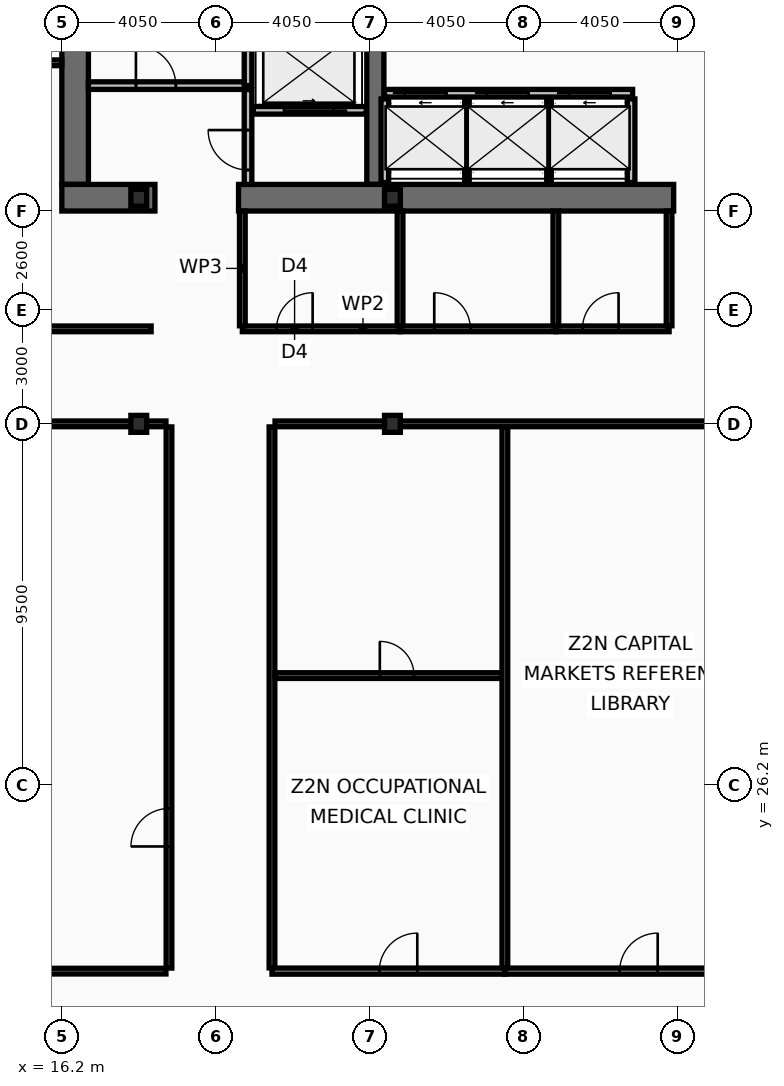
"""IFC4 building model, lengths in metres.
Left out: names, types, materials, properties, quantities, classifications, styles, units other than length and angle.
Written with IfcOpenShell. Run it as: python <this file> out.ifc"""

import sys

from ifc_helpers import new_model, si_unit, direction, frame, frame_2d, origin, origin_2d, place, context, subcontext, project, spatial, rectangle, i_section, extrude, element, fill, save


model = new_model("IFC4")
c1 = context("Model", 3, precision=1e-05, world=origin(), true_north=direction((0.0, 1.0)))
c2 = subcontext(c1, "Body", "Model", "MODEL_VIEW")
j1 = project(units=[si_unit("LENGTHUNIT", "METRE"), si_unit("PLANEANGLEUNIT", "RADIAN")], contexts=[c1])
p1 = place(None, origin())
s1 = spatial("IfcSite", under=j1, at=p1, CompositionType="ELEMENT")
p2 = place(p1, origin())
s2 = spatial("IfcBuilding", under=s1, at=p2, CompositionType="ELEMENT")
p3 = place(p2, frame((0.0, 0.0, 111.0)))
s3 = spatial("IfcBuildingStorey", under=s2, at=p3, CompositionType="ELEMENT", Elevation=111.0)
p4 = place(p3, frame((16.55, 42.0, 0.0), z_axis=(0.0, 0.0, 1.0), x_axis=(0.0, 1.0, 0.0)))
e1 = element("IfcWall", 1, at=p4, inside=s3, PredefinedType="SHEAR", context=c2, shape_type="SweptSolid", body=[
    extrude(rectangle(XDim=11.0, YDim=0.7, at=frame_2d((5.5, 0.0))), origin(), (0.0, 0.0, 1.0), 3.44),
])
p5 = place(p3, frame((24.45, 42.0, 0.0), z_axis=(0.0, 0.0, 1.0), x_axis=(0.0, 1.0, 0.0)))
e2 = element("IfcWall", 2, at=p5, inside=s3, PredefinedType="SHEAR", context=c2, shape_type="SweptSolid", body=[
    extrude(rectangle(XDim=11.0, YDim=0.45, at=frame_2d((5.5, 0.0))), origin(), (0.0, 0.0, 1.0), 3.44),
])
p6 = place(p3, frame((18.65, 41.65, 0.0), z_axis=(0.0, 0.0, 1.0), x_axis=(-1.0, 0.0, 0.0)))
e3 = element("IfcWall", 3, at=p6, inside=s3, PredefinedType="SHEAR", context=c2, shape_type="SweptSolid", body=[
    extrude(rectangle(XDim=2.45, YDim=0.7, at=frame_2d((1.225, 0.0))), origin(), (0.0, 0.0, 1.0), 3.44),
])
p7 = place(p3, frame((32.3, 41.65, 0.0), z_axis=(0.0, 0.0, 1.0), x_axis=(-1.0, 0.0, 0.0)))
e4 = element("IfcWall", 4, at=p7, inside=s3, PredefinedType="SHEAR", context=c2, shape_type="SweptSolid", body=[
    extrude(rectangle(XDim=11.45, YDim=0.7, at=frame_2d((5.725, 0.0))), origin(), (0.0, 0.0, 1.0), 3.44),
])
for number, where, z_axis, x_axis in (
    (5, (18.225, 35.7, 0.0), (0.0, 0.0, 1.0), (1.0, 0.0, 0.0)),
    (6, (18.225, 41.65, 0.0), (0.0, 0.0, 1.0), (1.0, 0.0, 0.0)),
    (7, (24.9, 35.7, 0.0), (0.0, 0.0, 1.0), (1.0, 0.0, 0.0)),
    (8, (24.9, 41.65, 0.0), (0.0, 0.0, 1.0), (1.0, 0.0, 0.0)),
):
    element("IfcColumn", number, at=place(p3, frame(where, z_axis=z_axis, x_axis=x_axis)), inside=s3, PredefinedType="COLUMN", context=c2, shape_type="SweptSolid", body=[
        extrude(i_section(OverallWidth=0.416, OverallDepth=0.446, WebThickness=0.039, FlangeThickness=0.063, at=origin_2d()), origin(), (0.0, 0.0, 1.0), 3.6),
    ])
p8 = place(p3, frame((24.69, 44.4, 0.0), z_axis=(0.0, 0.0, 1.0), x_axis=(1.0, 0.0, 0.0)))
e9 = element("IfcWall", 9, at=p8, inside=s3, PredefinedType="PARTITIONING", context=c2, shape_type="SweptSolid", body=[
    extrude(rectangle(XDim=6.53, YDim=0.2, at=frame_2d((3.265, 0.0))), origin(), (0.0, 0.0, 1.0), 3.44),
])
p9 = place(p8, frame((0.53, 0.0, 0.0)))
e10 = element("IfcOpeningElement", 10, at=p9, cuts=e9, PredefinedType="OPENING", context=c2, shape_type="SweptSolid", body=[
    extrude(rectangle(XDim=1.1, YDim=2.18, at=frame_2d((0.55, 1.09))), frame((0.0, 0.11, 0.0), z_axis=(0.0, -1.0, 0.0), x_axis=(1.0, 0.0, 0.0)), (0.0, 0.0, 1.0), 0.22),
])
p10 = place(p8, frame((2.69, 0.0, 0.0)))
e11 = element("IfcOpeningElement", 11, at=p10, cuts=e9, PredefinedType="OPENING", context=c2, shape_type="SweptSolid", body=[
    extrude(rectangle(XDim=1.1, YDim=2.18, at=frame_2d((0.55, 1.09))), frame((0.0, 0.11, 0.0), z_axis=(0.0, -1.0, 0.0), x_axis=(1.0, 0.0, 0.0)), (0.0, 0.0, 1.0), 0.22),
])
p11 = place(p8, frame((4.85, 0.0, 0.0)))
e12 = element("IfcOpeningElement", 12, at=p11, cuts=e9, PredefinedType="OPENING", context=c2, shape_type="SweptSolid", body=[
    extrude(rectangle(XDim=1.1, YDim=2.18, at=frame_2d((0.55, 1.09))), frame((0.0, 0.11, 0.0), z_axis=(0.0, -1.0, 0.0), x_axis=(1.0, 0.0, 0.0)), (0.0, 0.0, 1.0), 0.22),
])
p12 = place(p3, frame((24.21, 43.95, 0.0), z_axis=(0.0, 0.0, 1.0), x_axis=(-1.0, 0.0, 0.0)))
e13 = element("IfcWall", 13, at=p12, inside=s3, PredefinedType="PARTITIONING", context=c2, shape_type="SweptSolid", body=[
    extrude(rectangle(XDim=2.97, YDim=0.2, at=frame_2d((1.485, 0.0))), origin(), (0.0, 0.0, 1.0), 3.44),
])
p13 = place(p12, frame((0.86, 0.0, 0.0)))
e14 = element("IfcOpeningElement", 14, at=p13, cuts=e13, PredefinedType="OPENING", context=c2, shape_type="SweptSolid", body=[
    extrude(rectangle(XDim=1.3, YDim=2.18, at=frame_2d((0.65, 1.09))), frame((0.0, 0.11, 0.0), z_axis=(0.0, -1.0, 0.0), x_axis=(1.0, 0.0, 0.0)), (0.0, 0.0, 1.0), 0.22),
])
p14 = place(p3, frame((21.1, 44.6, 0.0), z_axis=(0.0, 0.0, 1.0), x_axis=(0.0, 1.0, 0.0)))
e15 = element("IfcWall", 15, at=p14, inside=s3, PredefinedType="PARTITIONING", context=c2, shape_type="SweptSolid", body=[
    extrude(rectangle(XDim=4.3, YDim=0.2, at=frame_2d((2.15, 0.0))), origin(), (0.0, 0.0, 1.0), 3.44),
])
p15 = place(p3, frame((16.9, 44.6, 0.0), z_axis=(0.0, 0.0, 1.0), x_axis=(1.0, 0.0, 0.0)))
e16 = element("IfcWall", 16, at=p15, inside=s3, PredefinedType="PARTITIONING", context=c2, shape_type="SweptSolid", body=[
    extrude(rectangle(XDim=4.1, YDim=0.2, at=frame_2d((2.05, 0.0))), origin(), (0.0, 0.0, 1.0), 3.44),
])
p16 = place(p15, frame((1.25, 0.0, 0.0)))
e17 = element("IfcOpeningElement", 17, at=p16, cuts=e16, PredefinedType="OPENING", context=c2, shape_type="SweptSolid", body=[
    extrude(rectangle(XDim=1.05, YDim=2.15, at=frame_2d((0.525, 1.075))), frame((0.0, 0.11, 0.0), z_axis=(0.0, -1.0, 0.0), x_axis=(1.0, 0.0, 0.0)), (0.0, 0.0, 1.0), 0.22),
])
p17 = place(p3, frame((21.1, 42.0, 0.0), z_axis=(0.0, 0.0, 1.0), x_axis=(0.0, 1.0, 0.0)))
e18 = element("IfcWall", 18, at=p17, inside=s3, PredefinedType="PARTITIONING", context=c2, shape_type="SweptSolid", body=[
    extrude(rectangle(XDim=2.495, YDim=0.2, at=frame_2d((1.248, 0.0))), origin(), (0.0, 0.0, 1.0), 3.44),
])
p18 = place(p17, frame((0.38, 0.0, 0.0)))
e19 = element("IfcOpeningElement", 19, at=p18, cuts=e18, PredefinedType="OPENING", context=c2, shape_type="SweptSolid", body=[
    extrude(rectangle(XDim=1.05, YDim=2.15, at=frame_2d((0.525, 1.075))), frame((0.0, 0.11, 0.0), z_axis=(0.0, -1.0, 0.0), x_axis=(1.0, 0.0, 0.0)), (0.0, 0.0, 1.0), 0.22),
])
for number, where, z_axis, x_axis in (
    (20, (24.7, 42.05, 0.0), (0.0, 0.0, 1.0), (0.0, 1.0, 0.0)),
    (21, (31.18, 42.05, 0.0), (0.0, 0.0, 1.0), (0.0, 1.0, 0.0)),
):
    element("IfcWall", number, at=place(p3, frame(where, z_axis=z_axis, x_axis=x_axis)), inside=s3, PredefinedType="PARTITIONING", context=c2, shape_type="SweptSolid", body=[
        extrude(rectangle(XDim=2.2, YDim=0.2, at=frame_2d((1.1, 0.0))), origin(), (0.0, 0.0, 1.0), 3.44),
    ])
for number, where, z_axis, x_axis in (
    (22, (26.86, 42.05, 0.0), (0.0, 0.0, 1.0), (0.0, 1.0, 0.0)),
    (23, (29.02, 42.05, 0.0), (0.0, 0.0, 1.0), (0.0, 1.0, 0.0)),
):
    element("IfcWall", number, at=place(p3, frame(where, z_axis=z_axis, x_axis=x_axis)), inside=s3, PredefinedType="PARTITIONING", context=c2, shape_type="SweptSolid", body=[
        extrude(rectangle(XDim=2.2, YDim=0.12, at=frame_2d((1.1, 0.0))), origin(), (0.0, 0.0, 1.0), 3.44),
    ])
p19 = place(p3, frame((20.95, 38.2, 0.0), z_axis=(0.0, 0.0, 1.0), x_axis=(1.0, 0.0, 0.0)))
e24 = element("IfcWall", 24, at=p19, inside=s3, PredefinedType="PARTITIONING", context=c2, shape_type="SweptSolid", body=[
    extrude(rectangle(XDim=4.15, YDim=0.15, at=frame_2d((2.075, 0.0))), origin(), (0.0, 0.0, 1.0), 2.73),
])
p20 = place(p19, frame((0.9, 0.0, 0.0)))
e25 = element("IfcOpeningElement", 25, at=p20, cuts=e24, PredefinedType="OPENING", context=c2, shape_type="SweptSolid", body=[
    extrude(rectangle(XDim=0.95, YDim=2.05, at=frame_2d((0.475, 1.025))), frame((0.0, 0.085, 0.0), z_axis=(0.0, -1.0, 0.0), x_axis=(1.0, 0.0, 0.0)), (0.0, 0.0, 1.0), 0.17),
])
p21 = place(p3, frame((25.1, 38.2, 0.0), z_axis=(0.0, 0.0, 1.0), x_axis=(1.0, 0.0, 0.0)))
e26 = element("IfcWall", 26, at=p21, inside=s3, PredefinedType="PARTITIONING", context=c2, shape_type="SweptSolid", body=[
    extrude(rectangle(XDim=4.1, YDim=0.15, at=frame_2d((2.05, 0.0))), origin(), (0.0, 0.0, 1.0), 2.73),
])
p22 = place(p21, frame((0.9, 0.0, 0.0)))
e27 = element("IfcOpeningElement", 27, at=p22, cuts=e26, PredefinedType="OPENING", context=c2, shape_type="SweptSolid", body=[
    extrude(rectangle(XDim=0.95, YDim=2.05, at=frame_2d((0.475, 1.025))), frame((0.0, 0.085, 0.0), z_axis=(0.0, -1.0, 0.0), x_axis=(1.0, 0.0, 0.0)), (0.0, 0.0, 1.0), 0.17),
])
p23 = place(p3, frame((29.2, 38.2, 0.0), z_axis=(0.0, 0.0, 1.0), x_axis=(1.0, 0.0, 0.0)))
e28 = element("IfcWall", 28, at=p23, inside=s3, PredefinedType="PARTITIONING", context=c2, shape_type="SweptSolid", body=[
    extrude(rectangle(XDim=2.98, YDim=0.15, at=frame_2d((1.49, 0.0))), origin(), (0.0, 0.0, 1.0), 2.73),
])
p24 = place(p23, frame((0.7, 0.0, 0.0)))
e29 = element("IfcOpeningElement", 29, at=p24, cuts=e28, PredefinedType="OPENING", context=c2, shape_type="SweptSolid", body=[
    extrude(rectangle(XDim=0.95, YDim=2.05, at=frame_2d((0.475, 1.025))), frame((0.0, 0.085, 0.0), z_axis=(0.0, -1.0, 0.0), x_axis=(1.0, 0.0, 0.0)), (0.0, 0.0, 1.0), 0.17),
])
p25 = place(p3, frame((20.95, 38.28, 0.0), z_axis=(0.0, 0.0, 1.0), x_axis=(0.0, 1.0, 0.0)))
e30 = element("IfcWall", 30, at=p25, inside=s3, PredefinedType="PARTITIONING", context=c2, shape_type="SweptSolid", body=[
    extrude(rectangle(XDim=3.02, YDim=0.15, at=frame_2d((1.51, 0.0))), origin(), (0.0, 0.0, 1.0), 3.44),
])
p26 = place(p3, frame((25.1, 38.28, 0.0), z_axis=(0.0, 0.0, 1.0), x_axis=(0.0, 1.0, 0.0)))
e31 = element("IfcWall", 31, at=p26, inside=s3, PredefinedType="PARTITIONING", context=c2, shape_type="SweptSolid", body=[
    extrude(rectangle(XDim=3.02, YDim=0.15, at=frame_2d((1.51, 0.0))), origin(), (0.0, 0.0, 1.0), 2.73),
])
for number, where, z_axis, x_axis in (
    (32, (29.2, 38.28, 0.0), (0.0, 0.0, 1.0), (0.0, 1.0, 0.0)),
    (33, (32.18, 38.28, 0.0), (0.0, 0.0, 1.0), (0.0, 1.0, 0.0)),
):
    element("IfcWall", number, at=place(p3, frame(where, z_axis=z_axis, x_axis=x_axis)), inside=s3, PredefinedType="PARTITIONING", context=c2, shape_type="SweptSolid", body=[
        extrude(rectangle(XDim=3.02, YDim=0.15, at=frame_2d((1.51, 0.0))), origin(), (0.0, 0.0, 1.0), 3.44),
    ])
p27 = place(p3, frame((4.03, 38.2, 0.0), z_axis=(0.0, 0.0, 1.0), x_axis=(1.0, 0.0, 0.0)))
e34 = element("IfcWall", 34, at=p27, inside=s3, PredefinedType="PARTITIONING", context=c2, shape_type="SweptSolid", body=[
    extrude(rectangle(XDim=14.52, YDim=0.15, at=frame_2d((7.26, 0.0))), origin(), (0.0, 0.0, 1.0), 2.73),
])
p28 = place(p27, frame((10.32, 0.0, 0.0)))
e35 = element("IfcOpeningElement", 35, at=p28, cuts=e34, PredefinedType="OPENING", context=c2, shape_type="SweptSolid", body=[
    extrude(rectangle(XDim=0.95, YDim=2.05, at=frame_2d((0.475, 1.025))), frame((0.0, 0.085, 0.0), z_axis=(0.0, -1.0, 0.0), x_axis=(1.0, 0.0, 0.0)), (0.0, 0.0, 1.0), 0.17),
])
p29 = place(p3, frame((4.095, 45.2, 0.0), z_axis=(0.0, 0.0, 1.0), x_axis=(1.0, 0.0, 0.0)))
e36 = element("IfcWall", 36, at=p29, inside=s3, PredefinedType="PARTITIONING", context=c2, shape_type="SweptSolid", body=[
    extrude(rectangle(XDim=12.105, YDim=0.15, at=frame_2d((6.052, 0.0))), origin(), (0.0, 0.0, 1.0), 2.83),
])
p30 = place(p29, frame((10.32, 0.0, 0.0)))
e37 = element("IfcOpeningElement", 37, at=p30, cuts=e36, PredefinedType="OPENING", context=c2, shape_type="SweptSolid", body=[
    extrude(rectangle(XDim=0.9, YDim=2.05, at=frame_2d((0.45, 1.025))), frame((0.0, 0.085, 0.0), z_axis=(0.0, -1.0, 0.0), x_axis=(1.0, 0.0, 0.0)), (0.0, 0.0, 1.0), 0.17),
])
p31 = place(p3, frame((19.02, 21.38, 0.0), z_axis=(0.0, 0.0, 1.0), x_axis=(0.0, 1.0, 0.0)))
e38 = element("IfcWall", 38, at=p31, inside=s3, PredefinedType="PARTITIONING", context=c2, shape_type="SweptSolid", body=[
    extrude(rectangle(XDim=14.24, YDim=0.15, at=frame_2d((7.12, 0.0))), origin(), (0.0, 0.0, 1.0), 2.88),
])
p32 = place(p31, frame((3.2, 0.0, 0.0)))
e39 = element("IfcOpeningElement", 39, at=p32, cuts=e38, PredefinedType="OPENING", context=c2, shape_type="SweptSolid", body=[
    extrude(rectangle(XDim=1.0, YDim=2.05, at=frame_2d((0.5, 1.025))), frame((0.0, 0.085, 0.0), z_axis=(0.0, -1.0, 0.0), x_axis=(1.0, 0.0, 0.0)), (0.0, 0.0, 1.0), 0.17),
])
for number, where, z_axis, x_axis in (
    (40, (4.095, 21.3, 0.0), (0.0, 0.0, 1.0), (1.0, 0.0, 0.0)),
    (41, (4.095, 35.7, 0.0), (0.0, 0.0, 1.0), (1.0, 0.0, 0.0)),
):
    element("IfcWall", number, at=place(p3, frame(where, z_axis=z_axis, x_axis=x_axis)), inside=s3, PredefinedType="PARTITIONING", context=c2, shape_type="SweptSolid", body=[
        extrude(rectangle(XDim=14.845, YDim=0.15, at=frame_2d((7.422, 0.0))), origin(), (0.0, 0.0, 1.0), 2.73),
    ])
p33 = place(p3, frame((21.73, 21.385, 0.0), z_axis=(0.0, 0.0, 1.0), x_axis=(0.0, 1.0, 0.0)))
e42 = element("IfcWall", 42, at=p33, inside=s3, PredefinedType="PARTITIONING", context=c2, shape_type="SweptSolid", body=[
    extrude(rectangle(XDim=14.235, YDim=0.15, at=frame_2d((7.118, 0.0))), origin(), (0.0, 0.0, 1.0), 2.88),
])
p34 = place(p3, frame((21.81, 35.7, 0.0), z_axis=(0.0, 0.0, 1.0), x_axis=(1.0, 0.0, 0.0)))
e43 = element("IfcWall", 43, at=p34, inside=s3, PredefinedType="PARTITIONING", context=c2, shape_type="SweptSolid", body=[
    extrude(rectangle(XDim=46.995, YDim=0.15, at=frame_2d((23.498, 0.0))), origin(), (0.0, 0.0, 1.0), 2.73),
])
p35 = place(p3, frame((21.73, 21.3, 0.0), z_axis=(0.0, 0.0, 1.0), x_axis=(1.0, 0.0, 0.0)))
e44 = element("IfcWall", 44, at=p35, inside=s3, PredefinedType="PARTITIONING", context=c2, shape_type="SweptSolid", body=[
    extrude(rectangle(XDim=6.128, YDim=0.16, at=frame_2d((3.064, 0.0))), origin(), (0.0, 0.0, 1.0), 2.73),
])
p36 = place(p35, frame((2.824, 0.0, 0.0)))
e45 = element("IfcOpeningElement", 45, at=p36, cuts=e44, PredefinedType="OPENING", context=c2, shape_type="SweptSolid", body=[
    extrude(rectangle(XDim=1.0, YDim=2.05, at=frame_2d((0.5, 1.025))), frame((0.0, 0.09, 0.0), z_axis=(0.0, -1.0, 0.0), x_axis=(1.0, 0.0, 0.0)), (0.0, 0.0, 1.0), 0.18),
])
p37 = place(p3, frame((21.81, 29.076, 0.0), z_axis=(0.0, 0.0, 1.0), x_axis=(1.0, 0.0, 0.0)))
e46 = element("IfcWall", 46, at=p37, inside=s3, PredefinedType="PARTITIONING", context=c2, shape_type="SweptSolid", body=[
    extrude(rectangle(XDim=5.968, YDim=0.15, at=frame_2d((2.984, 0.0))), origin(), (0.0, 0.0, 1.0), 2.73),
])
p38 = place(p37, frame((2.758, 0.0, 0.0)))
e47 = element("IfcOpeningElement", 47, at=p38, cuts=e46, PredefinedType="OPENING", context=c2, shape_type="SweptSolid", body=[
    extrude(rectangle(XDim=0.9, YDim=2.05, at=frame_2d((0.45, 1.025))), frame((0.0, 0.085, 0.0), z_axis=(0.0, -1.0, 0.0), x_axis=(1.0, 0.0, 0.0)), (0.0, 0.0, 1.0), 0.17),
])
p39 = place(p3, frame((27.858, 21.3, 0.0), z_axis=(0.0, 0.0, 1.0), x_axis=(1.0, 0.0, 0.0)))
e48 = element("IfcWall", 48, at=p39, inside=s3, PredefinedType="PARTITIONING", context=c2, shape_type="SweptSolid", body=[
    extrude(rectangle(XDim=6.6, YDim=0.16, at=frame_2d((3.3, 0.0))), origin(), (0.0, 0.0, 1.0), 2.73),
])
p40 = place(p39, frame((3.022, 0.0, 0.0)))
e49 = element("IfcOpeningElement", 49, at=p40, cuts=e48, PredefinedType="OPENING", context=c2, shape_type="SweptSolid", body=[
    extrude(rectangle(XDim=1.0, YDim=2.05, at=frame_2d((0.5, 1.025))), frame((0.0, 0.09, 0.0), z_axis=(0.0, -1.0, 0.0), x_axis=(1.0, 0.0, 0.0)), (0.0, 0.0, 1.0), 0.18),
])
p41 = place(p3, frame((27.858, 21.385, 0.0), z_axis=(0.0, 0.0, 1.0), x_axis=(0.0, 1.0, 0.0)))
e50 = element("IfcWall", 50, at=p41, inside=s3, PredefinedType="PARTITIONING", context=c2, shape_type="SweptSolid", body=[
    extrude(rectangle(XDim=14.235, YDim=0.15, at=frame_2d((7.118, 0.0))), origin(), (0.0, 0.0, 1.0), 2.88),
])
p42 = place(p9, origin())
e51 = element("IfcDoor", 51, at=p42, inside=s3, OperationType="SLIDING_TO_LEFT", PredefinedType="DOOR", context=c2, shape_type="SweptSolid", body=[
    extrude(rectangle(XDim=1.1, YDim=2.18, at=frame_2d((0.55, 1.09))), frame((0.0, 0.025, 0.0), z_axis=(0.0, -1.0, 0.0), x_axis=(1.0, 0.0, 0.0)), (0.0, 0.0, 1.0), 0.05),
])
fill(e10, e51)
p43 = place(p10, origin())
e52 = element("IfcDoor", 52, at=p43, inside=s3, OperationType="SLIDING_TO_LEFT", PredefinedType="DOOR", context=c2, shape_type="SweptSolid", body=[
    extrude(rectangle(XDim=1.1, YDim=2.18, at=frame_2d((0.55, 1.09))), frame((0.0, 0.025, 0.0), z_axis=(0.0, -1.0, 0.0), x_axis=(1.0, 0.0, 0.0)), (0.0, 0.0, 1.0), 0.05),
])
fill(e11, e52)
p44 = place(p11, origin())
e53 = element("IfcDoor", 53, at=p44, inside=s3, OperationType="SLIDING_TO_LEFT", PredefinedType="DOOR", context=c2, shape_type="SweptSolid", body=[
    extrude(rectangle(XDim=1.1, YDim=2.18, at=frame_2d((0.55, 1.09))), frame((0.0, 0.025, 0.0), z_axis=(0.0, -1.0, 0.0), x_axis=(1.0, 0.0, 0.0)), (0.0, 0.0, 1.0), 0.05),
])
fill(e12, e53)
p45 = place(p13, origin())
e54 = element("IfcDoor", 54, at=p45, inside=s3, OperationType="SLIDING_TO_LEFT", PredefinedType="DOOR", context=c2, shape_type="SweptSolid", body=[
    extrude(rectangle(XDim=1.3, YDim=2.18, at=frame_2d((0.65, 1.09))), frame((0.0, 0.025, 0.0), z_axis=(0.0, -1.0, 0.0), x_axis=(1.0, 0.0, 0.0)), (0.0, 0.0, 1.0), 0.05),
])
fill(e14, e54)
p46 = place(p16, origin())
e55 = element("IfcDoor", 55, at=p46, inside=s3, OperationType="SINGLE_SWING_LEFT", PredefinedType="DOOR", context=c2, shape_type="SweptSolid", body=[
    extrude(rectangle(XDim=1.05, YDim=2.15, at=frame_2d((0.525, 1.075))), frame((0.0, 0.025, 0.0), z_axis=(0.0, -1.0, 0.0), x_axis=(1.0, 0.0, 0.0)), (0.0, 0.0, 1.0), 0.05),
])
fill(e17, e55)
p47 = place(p18, origin())
e56 = element("IfcDoor", 56, at=p47, inside=s3, OperationType="SINGLE_SWING_RIGHT", PredefinedType="DOOR", context=c2, shape_type="SweptSolid", body=[
    extrude(rectangle(XDim=1.05, YDim=2.15, at=frame_2d((0.525, 1.075))), frame((0.0, 0.025, 0.0), z_axis=(0.0, -1.0, 0.0), x_axis=(1.0, 0.0, 0.0)), (0.0, 0.0, 1.0), 0.05),
])
fill(e19, e56)
p48 = place(p20, origin())
e57 = element("IfcDoor", 57, at=p48, inside=s3, OperationType="SINGLE_SWING_RIGHT", PredefinedType="DOOR", context=c2, shape_type="SweptSolid", body=[
    extrude(rectangle(XDim=0.95, YDim=2.05, at=frame_2d((0.475, 1.025))), frame((0.0, 0.025, 0.0), z_axis=(0.0, -1.0, 0.0), x_axis=(1.0, 0.0, 0.0)), (0.0, 0.0, 1.0), 0.05),
])
fill(e25, e57)
p49 = place(p22, origin())
e58 = element("IfcDoor", 58, at=p49, inside=s3, OperationType="SINGLE_SWING_LEFT", PredefinedType="DOOR", context=c2, shape_type="SweptSolid", body=[
    extrude(rectangle(XDim=0.95, YDim=2.05, at=frame_2d((0.475, 1.025))), frame((0.0, 0.025, 0.0), z_axis=(0.0, -1.0, 0.0), x_axis=(1.0, 0.0, 0.0)), (0.0, 0.0, 1.0), 0.05),
])
fill(e27, e58)
p50 = place(p24, origin())
e59 = element("IfcDoor", 59, at=p50, inside=s3, OperationType="SINGLE_SWING_RIGHT", PredefinedType="DOOR", context=c2, shape_type="SweptSolid", body=[
    extrude(rectangle(XDim=0.95, YDim=2.05, at=frame_2d((0.475, 1.025))), frame((0.0, 0.025, 0.0), z_axis=(0.0, -1.0, 0.0), x_axis=(1.0, 0.0, 0.0)), (0.0, 0.0, 1.0), 0.05),
])
fill(e29, e59)
p51 = place(p32, origin())
e60 = element("IfcDoor", 60, at=p51, inside=s3, OperationType="SINGLE_SWING_LEFT", PredefinedType="DOOR", context=c2, shape_type="SweptSolid", body=[
    extrude(rectangle(XDim=1.0, YDim=2.05, at=frame_2d((0.5, 1.025))), frame((0.0, 0.025, 0.0), z_axis=(0.0, -1.0, 0.0), x_axis=(1.0, 0.0, 0.0)), (0.0, 0.0, 1.0), 0.05),
])
fill(e39, e60)
p52 = place(p36, origin())
e61 = element("IfcDoor", 61, at=p52, inside=s3, OperationType="SINGLE_SWING_RIGHT", PredefinedType="DOOR", context=c2, shape_type="SweptSolid", body=[
    extrude(rectangle(XDim=1.0, YDim=2.05, at=frame_2d((0.5, 1.025))), frame((0.0, 0.025, 0.0), z_axis=(0.0, -1.0, 0.0), x_axis=(1.0, 0.0, 0.0)), (0.0, 0.0, 1.0), 0.05),
])
fill(e45, e61)
p53 = place(p38, origin())
e62 = element("IfcDoor", 62, at=p53, inside=s3, OperationType="SINGLE_SWING_LEFT", PredefinedType="DOOR", context=c2, shape_type="SweptSolid", body=[
    extrude(rectangle(XDim=0.9, YDim=2.05, at=frame_2d((0.45, 1.025))), frame((0.0, 0.025, 0.0), z_axis=(0.0, -1.0, 0.0), x_axis=(1.0, 0.0, 0.0)), (0.0, 0.0, 1.0), 0.05),
])
fill(e47, e62)
p54 = place(p40, origin())
e63 = element("IfcDoor", 63, at=p54, inside=s3, OperationType="SINGLE_SWING_RIGHT", PredefinedType="DOOR", context=c2, shape_type="SweptSolid", body=[
    extrude(rectangle(XDim=1.0, YDim=2.05, at=frame_2d((0.5, 1.025))), frame((0.0, 0.025, 0.0), z_axis=(0.0, -1.0, 0.0), x_axis=(1.0, 0.0, 0.0)), (0.0, 0.0, 1.0), 0.05),
])
fill(e49, e63)
save(model, sys.argv[1])
